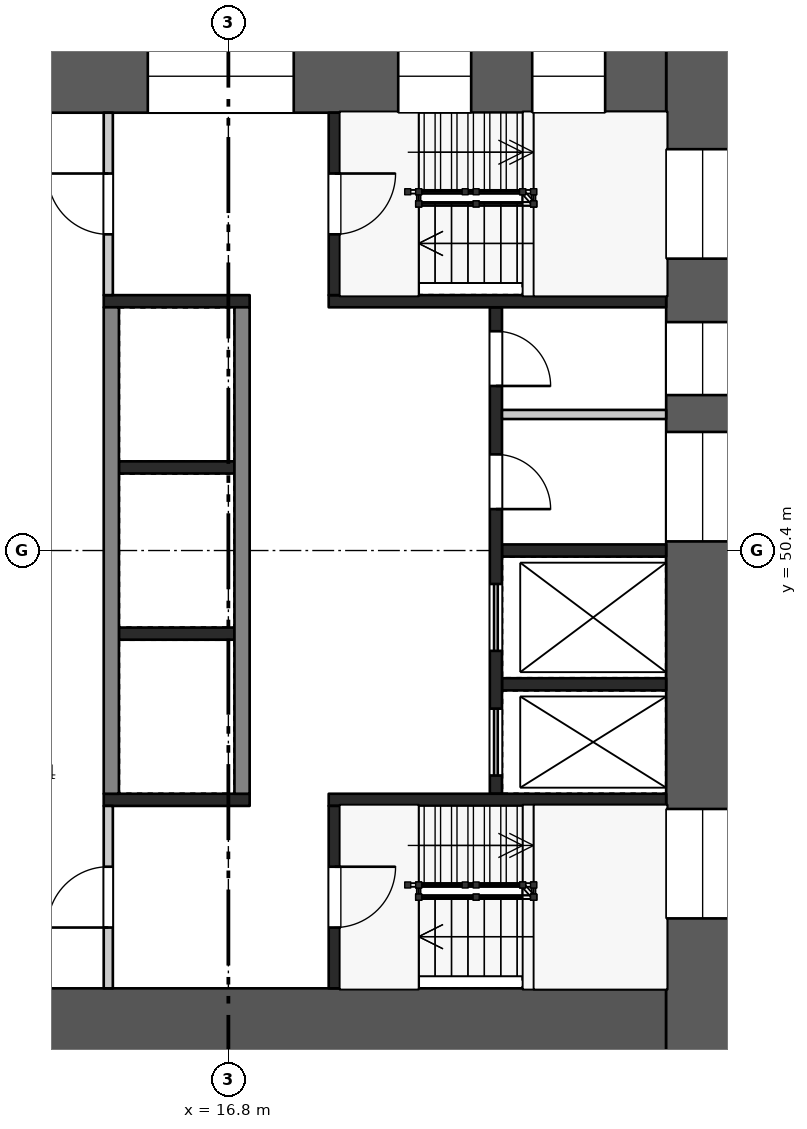
"""IFC4 building model, lengths in metres.
Left out: names, types, materials, properties, quantities, classifications, styles, units other than length and angle.
Written with IfcOpenShell. Run it as: python <this file> out.ifc"""

import sys

from ifc_helpers import new_model, si_unit, direction, frame, frame_2d, origin, place, context, subcontext, project, spatial, rectangle, extrude, element, fill, save


model = new_model("IFC4")
c1 = context("Model", 3, precision=1e-05, world=origin(), true_north=direction((0.0, 1.0)))
c2 = subcontext(c1, "Body", "Model", "MODEL_VIEW")
j1 = project(units=[si_unit("LENGTHUNIT", "METRE"), si_unit("PLANEANGLEUNIT", "RADIAN")], contexts=[c1])
p1 = place(None, origin())
s1 = spatial("IfcSite", under=j1, at=p1, CompositionType="ELEMENT")
p2 = place(p1, origin())
s2 = spatial("IfcBuilding", under=s1, at=p2, CompositionType="ELEMENT")
p3 = place(p2, frame((0.0, 0.0, 19.8)))
s3 = spatial("IfcBuildingStorey", under=s2, at=p3, CompositionType="ELEMENT", Elevation=19.8)
p4 = place(p3, frame((24.6, 58.8, 0.0), z_axis=(0.0, 0.0, 1.0), x_axis=(0.0, -1.0, 0.0)))
e1 = element("IfcWall", 1, at=p4, inside=s3, PredefinedType="SHEAR", context=c2, shape_type="SweptSolid", body=[
    extrude(rectangle(XDim=16.8, YDim=1.2, at=frame_2d((8.4, 0.0))), origin(), (0.0, 0.0, 1.0), 5.12),
])
p5 = place(p4, frame((1.8, 0.0, 0.5)))
e2 = element("IfcOpeningElement", 2, at=p5, cuts=e1, PredefinedType="OPENING", context=c2, shape_type="SweptSolid", body=[
    extrude(rectangle(XDim=1.8, YDim=2.4, at=frame_2d((0.9, 1.2))), frame((0.0, 0.61, 0.0), z_axis=(0.0, -1.0, 0.0), x_axis=(1.0, 0.0, 0.0)), (0.0, 0.0, 1.0), 1.22),
])
p6 = place(p4, frame((4.644, 0.0, 1.6)))
e3 = element("IfcOpeningElement", 3, at=p6, cuts=e1, PredefinedType="OPENING", context=c2, shape_type="SweptSolid", body=[
    extrude(rectangle(XDim=1.2, YDim=1.2, at=frame_2d((0.6, 0.6))), frame((0.0, 0.61, 0.0), z_axis=(0.0, -1.0, 0.0), x_axis=(1.0, 0.0, 0.0)), (0.0, 0.0, 1.0), 1.22),
])
p7 = place(p4, frame((6.45, 0.0, 1.6)))
e4 = element("IfcOpeningElement", 4, at=p7, cuts=e1, PredefinedType="OPENING", context=c2, shape_type="SweptSolid", body=[
    extrude(rectangle(XDim=1.8, YDim=1.2, at=frame_2d((0.9, 0.6))), frame((0.0, 0.61, 0.0), z_axis=(0.0, -1.0, 0.0), x_axis=(1.0, 0.0, 0.0)), (0.0, 0.0, 1.0), 1.22),
])
p8 = place(p4, frame((12.65, 0.0, 0.5)))
e5 = element("IfcOpeningElement", 5, at=p8, cuts=e1, PredefinedType="OPENING", context=c2, shape_type="SweptSolid", body=[
    extrude(rectangle(XDim=1.8, YDim=2.4, at=frame_2d((0.9, 1.2))), frame((0.0, 0.61, 0.0), z_axis=(0.0, -1.0, 0.0), x_axis=(1.0, 0.0, 0.0)), (0.0, 0.0, 1.0), 1.22),
])
p9 = place(p3, frame((9.6, 58.2, 0.0), z_axis=(0.0, 0.0, 1.0), x_axis=(1.0, 0.0, 0.0)))
e6 = element("IfcWall", 6, at=p9, inside=s3, PredefinedType="SHEAR", context=c2, shape_type="SweptSolid", body=[
    extrude(rectangle(XDim=14.4, YDim=1.2, at=frame_2d((7.2, 0.0))), origin(), (0.0, 0.0, 1.0), 5.12),
])
p10 = place(p9, frame((1.105, 0.0, 0.6)))
e7 = element("IfcOpeningElement", 7, at=p10, cuts=e6, PredefinedType="OPENING", context=c2, shape_type="SweptSolid", body=[
    extrude(rectangle(XDim=3.0, YDim=2.1, at=frame_2d((1.5, 1.05))), frame((0.0, 0.61, 0.0), z_axis=(0.0, -1.0, 0.0), x_axis=(1.0, 0.0, 0.0)), (0.0, 0.0, 1.0), 1.22),
])
p11 = place(p9, frame((5.875, 0.0, 0.6)))
e8 = element("IfcOpeningElement", 8, at=p11, cuts=e6, PredefinedType="OPENING", context=c2, shape_type="SweptSolid", body=[
    extrude(rectangle(XDim=2.4, YDim=2.1, at=frame_2d((1.2, 1.05))), frame((0.0, 0.61, 0.0), z_axis=(0.0, -1.0, 0.0), x_axis=(1.0, 0.0, 0.0)), (0.0, 0.0, 1.0), 1.22),
])
p12 = place(p9, frame((9.993, 0.0, 0.5)))
e9 = element("IfcOpeningElement", 9, at=p12, cuts=e6, PredefinedType="OPENING", context=c2, shape_type="SweptSolid", body=[
    extrude(rectangle(XDim=1.2, YDim=2.4, at=frame_2d((0.6, 1.2))), frame((0.0, 0.61, 0.0), z_axis=(0.0, -1.0, 0.0), x_axis=(1.0, 0.0, 0.0)), (0.0, 0.0, 1.0), 1.22),
])
p13 = place(p9, frame((12.197, 0.0, 0.5)))
e10 = element("IfcOpeningElement", 10, at=p13, cuts=e6, PredefinedType="OPENING", context=c2, shape_type="SweptSolid", body=[
    extrude(rectangle(XDim=1.2, YDim=2.4, at=frame_2d((0.6, 1.2))), frame((0.0, 0.61, 0.0), z_axis=(0.0, -1.0, 0.0), x_axis=(1.0, 0.0, 0.0)), (0.0, 0.0, 1.0), 1.22),
])
p14 = place(p3, frame((9.6, 42.6, 0.0), z_axis=(0.0, 0.0, 1.0), x_axis=(1.0, 0.0, 0.0)))
e11 = element("IfcWall", 11, at=p14, inside=s3, PredefinedType="SHEAR", context=c2, shape_type="SweptSolid", body=[
    extrude(rectangle(XDim=14.4, YDim=1.2, at=frame_2d((7.2, 0.0))), origin(), (0.0, 0.0, 1.0), 5.12),
])
p15 = place(p14, frame((2.1, 0.0, 0.0)))
e12 = element("IfcOpeningElement", 12, at=p15, cuts=e11, PredefinedType="OPENING", context=c2, shape_type="SweptSolid", body=[
    extrude(rectangle(XDim=1.8, YDim=2.1, at=frame_2d((0.9, 1.05))), frame((0.0, 0.61, 0.0), z_axis=(0.0, -1.0, 0.0), x_axis=(1.0, 0.0, 0.0)), (0.0, 0.0, 1.0), 1.22),
])
for number, where, z_axis, x_axis in (
    (13, (15.0, 51.767, 0.0), (0.0, 0.0, 1.0), (1.0, 0.0, 0.0)),
    (14, (15.0, 49.033, 0.0), (0.0, 0.0, 1.0), (1.0, 0.0, 0.0)),
):
    element("IfcWall", number, at=place(p3, frame(where, z_axis=z_axis, x_axis=x_axis)), inside=s3, PredefinedType="SHEAR", context=c2, shape_type="SweptSolid", body=[
        extrude(rectangle(XDim=1.9, YDim=0.2, at=frame_2d((0.95, 0.0))), origin(), (0.0, 0.0, 1.0), 5.12),
    ])
for number, where, z_axis, x_axis in (
    (15, (14.875, 54.4, 0.0), (0.0, 0.0, 1.0), (0.0, -1.0, 0.0)),
    (16, (17.025, 54.4, 0.0), (0.0, 0.0, 1.0), (0.0, -1.0, 0.0)),
):
    element("IfcWall", number, at=place(p3, frame(where, z_axis=z_axis, x_axis=x_axis)), inside=s3, PredefinedType="SHEAR", context=c2, shape_type="SweptSolid", body=[
        extrude(rectangle(XDim=8.0, YDim=0.25, at=frame_2d((4.0, 0.0))), origin(), (0.0, 0.0, 1.0), 5.12),
    ])
for number, where, z_axis, x_axis in (
    (17, (21.3, 50.4, 0.0), (0.0, 0.0, 1.0), (1.0, 0.0, 0.0)),
    (18, (21.3, 48.2, 0.0), (0.0, 0.0, 1.0), (1.0, 0.0, 0.0)),
):
    element("IfcWall", number, at=place(p3, frame(where, z_axis=z_axis, x_axis=x_axis)), inside=s3, PredefinedType="SHEAR", context=c2, shape_type="SweptSolid", body=[
        extrude(rectangle(XDim=2.7, YDim=0.2, at=frame_2d((1.35, 0.0))), origin(), (0.0, 0.0, 1.0), 5.12),
    ])
p16 = place(p3, frame((21.3, 52.637, 0.0), z_axis=(0.0, 0.0, 1.0), x_axis=(1.0, 0.0, 0.0)))
e19 = element("IfcWall", 19, at=p16, inside=s3, PredefinedType="PARTITIONING", context=c2, shape_type="SweptSolid", body=[
    extrude(rectangle(XDim=2.7, YDim=0.15, at=frame_2d((1.35, 0.0))), origin(), (0.0, 0.0, 1.0), 5.12),
])
p17 = place(p3, frame((21.2, 54.4, 0.0), z_axis=(0.0, 0.0, 1.0), x_axis=(0.0, -1.0, 0.0)))
e20 = element("IfcWall", 20, at=p17, inside=s3, PredefinedType="SHEAR", context=c2, shape_type="SweptSolid", body=[
    extrude(rectangle(XDim=8.0, YDim=0.2, at=frame_2d((4.0, 0.0))), origin(), (0.0, 0.0, 1.0), 5.12),
])
p18 = place(p17, frame((0.394, 0.0, 0.0)))
e21 = element("IfcOpeningElement", 21, at=p18, cuts=e20, PredefinedType="OPENING", context=c2, shape_type="SweptSolid", body=[
    extrude(rectangle(XDim=0.9, YDim=2.1, at=frame_2d((0.45, 1.05))), frame((0.0, 0.11, 0.0), z_axis=(0.0, -1.0, 0.0), x_axis=(1.0, 0.0, 0.0)), (0.0, 0.0, 1.0), 0.22),
])
p19 = place(p17, frame((2.419, 0.0, 0.0)))
e22 = element("IfcOpeningElement", 22, at=p19, cuts=e20, PredefinedType="OPENING", context=c2, shape_type="SweptSolid", body=[
    extrude(rectangle(XDim=0.9, YDim=2.1, at=frame_2d((0.45, 1.05))), frame((0.0, 0.11, 0.0), z_axis=(0.0, -1.0, 0.0), x_axis=(1.0, 0.0, 0.0)), (0.0, 0.0, 1.0), 0.22),
])
p20 = place(p17, frame((4.55, 0.0, 0.0)))
e23 = element("IfcOpeningElement", 23, at=p20, cuts=e20, PredefinedType="OPENING", context=c2, shape_type="SweptSolid", body=[
    extrude(rectangle(XDim=1.1, YDim=2.1, at=frame_2d((0.55, 1.05))), frame((0.0, 0.11, 0.0), z_axis=(0.0, -1.0, 0.0), x_axis=(1.0, 0.0, 0.0)), (0.0, 0.0, 1.0), 0.22),
])
p21 = place(p17, frame((6.6, 0.0, 0.0)))
e24 = element("IfcOpeningElement", 24, at=p21, cuts=e20, PredefinedType="OPENING", context=c2, shape_type="SweptSolid", body=[
    extrude(rectangle(XDim=1.1, YDim=2.1, at=frame_2d((0.55, 1.05))), frame((0.0, 0.11, 0.0), z_axis=(0.0, -1.0, 0.0), x_axis=(1.0, 0.0, 0.0)), (0.0, 0.0, 1.0), 0.22),
])
p22 = place(p3, frame((14.75, 54.5, 0.0), z_axis=(0.0, 0.0, 1.0), x_axis=(1.0, 0.0, 0.0)))
e25 = element("IfcWall", 25, at=p22, inside=s3, PredefinedType="SHEAR", context=c2, shape_type="SweptSolid", body=[
    extrude(rectangle(XDim=2.4, YDim=0.2, at=frame_2d((1.2, 0.0))), origin(), (0.0, 0.0, 1.0), 5.12),
])
p23 = place(p3, frame((18.45, 54.5, 0.0), z_axis=(0.0, 0.0, 1.0), x_axis=(1.0, 0.0, 0.0)))
e26 = element("IfcWall", 26, at=p23, inside=s3, PredefinedType="SHEAR", context=c2, shape_type="SweptSolid", body=[
    extrude(rectangle(XDim=5.55, YDim=0.2, at=frame_2d((2.775, 0.0))), origin(), (0.0, 0.0, 1.0), 5.12),
])
p24 = place(p3, frame((14.825, 57.6, 0.0), z_axis=(0.0, 0.0, 1.0), x_axis=(0.0, -1.0, 0.0)))
e27 = element("IfcWall", 27, at=p24, inside=s3, PredefinedType="PARTITIONING", context=c2, shape_type="SweptSolid", body=[
    extrude(rectangle(XDim=3.0, YDim=0.15, at=frame_2d((1.5, 0.0))), origin(), (0.0, 0.0, 1.0), 5.12),
])
p25 = place(p24, frame((1.0, 0.0, 0.0)))
e28 = element("IfcOpeningElement", 28, at=p25, cuts=e27, PredefinedType="OPENING", context=c2, shape_type="SweptSolid", body=[
    extrude(rectangle(XDim=1.0, YDim=2.1, at=frame_2d((0.5, 1.05))), frame((0.0, 0.085, 0.0), z_axis=(0.0, -1.0, 0.0), x_axis=(1.0, 0.0, 0.0)), (0.0, 0.0, 1.0), 0.17),
])
p26 = place(p3, frame((18.55, 57.6, 0.0), z_axis=(0.0, 0.0, 1.0), x_axis=(0.0, -1.0, 0.0)))
e29 = element("IfcWall", 29, at=p26, inside=s3, PredefinedType="SHEAR", context=c2, shape_type="SweptSolid", body=[
    extrude(rectangle(XDim=3.0, YDim=0.2, at=frame_2d((1.5, 0.0))), origin(), (0.0, 0.0, 1.0), 5.12),
])
p27 = place(p26, frame((1.0, 0.0, 0.0)))
e30 = element("IfcOpeningElement", 30, at=p27, cuts=e29, PredefinedType="OPENING", context=c2, shape_type="SweptSolid", body=[
    extrude(rectangle(XDim=1.0, YDim=2.1, at=frame_2d((0.5, 1.05))), frame((0.0, 0.11, 0.0), z_axis=(0.0, -1.0, 0.0), x_axis=(1.0, 0.0, 0.0)), (0.0, 0.0, 1.0), 0.22),
])
p28 = place(p3, frame((14.75, 46.3, 0.0), z_axis=(0.0, 0.0, 1.0), x_axis=(1.0, 0.0, 0.0)))
e31 = element("IfcWall", 31, at=p28, inside=s3, PredefinedType="SHEAR", context=c2, shape_type="SweptSolid", body=[
    extrude(rectangle(XDim=2.4, YDim=0.2, at=frame_2d((1.2, 0.0))), origin(), (0.0, 0.0, 1.0), 5.12),
])
p29 = place(p3, frame((18.45, 46.3, 0.0), z_axis=(0.0, 0.0, 1.0), x_axis=(1.0, 0.0, 0.0)))
e32 = element("IfcWall", 32, at=p29, inside=s3, PredefinedType="SHEAR", context=c2, shape_type="SweptSolid", body=[
    extrude(rectangle(XDim=5.55, YDim=0.2, at=frame_2d((2.775, 0.0))), origin(), (0.0, 0.0, 1.0), 5.12),
])
p30 = place(p3, frame((14.825, 46.2, 0.0), z_axis=(0.0, 0.0, 1.0), x_axis=(0.0, -1.0, 0.0)))
e33 = element("IfcWall", 33, at=p30, inside=s3, PredefinedType="PARTITIONING", context=c2, shape_type="SweptSolid", body=[
    extrude(rectangle(XDim=3.0, YDim=0.15, at=frame_2d((1.5, 0.0))), origin(), (0.0, 0.0, 1.0), 5.12),
])
p31 = place(p30, frame((1.0, 0.0, 0.0)))
e34 = element("IfcOpeningElement", 34, at=p31, cuts=e33, PredefinedType="OPENING", context=c2, shape_type="SweptSolid", body=[
    extrude(rectangle(XDim=1.0, YDim=2.1, at=frame_2d((0.5, 1.05))), frame((0.0, 0.085, 0.0), z_axis=(0.0, -1.0, 0.0), x_axis=(1.0, 0.0, 0.0)), (0.0, 0.0, 1.0), 0.17),
])
p32 = place(p3, frame((18.55, 46.2, 0.0), z_axis=(0.0, 0.0, 1.0), x_axis=(0.0, -1.0, 0.0)))
e35 = element("IfcWall", 35, at=p32, inside=s3, PredefinedType="SHEAR", context=c2, shape_type="SweptSolid", body=[
    extrude(rectangle(XDim=3.0, YDim=0.2, at=frame_2d((1.5, 0.0))), origin(), (0.0, 0.0, 1.0), 5.12),
])
p33 = place(p32, frame((1.0, 0.0, 0.0)))
e36 = element("IfcOpeningElement", 36, at=p33, cuts=e35, PredefinedType="OPENING", context=c2, shape_type="SweptSolid", body=[
    extrude(rectangle(XDim=1.0, YDim=2.1, at=frame_2d((0.5, 1.05))), frame((0.0, 0.11, 0.0), z_axis=(0.0, -1.0, 0.0), x_axis=(1.0, 0.0, 0.0)), (0.0, 0.0, 1.0), 0.22),
])
p34 = place(p18, origin())
e37 = element("IfcDoor", 37, at=p34, inside=s3, OperationType="SINGLE_SWING_RIGHT", PredefinedType="DOOR", context=c2, shape_type="SweptSolid", body=[
    extrude(rectangle(XDim=0.9, YDim=2.1, at=frame_2d((0.45, 1.05))), frame((0.0, 0.025, 0.0), z_axis=(0.0, -1.0, 0.0), x_axis=(1.0, 0.0, 0.0)), (0.0, 0.0, 1.0), 0.05),
])
fill(e21, e37)
p35 = place(p19, origin())
e38 = element("IfcDoor", 38, at=p35, inside=s3, OperationType="SINGLE_SWING_RIGHT", PredefinedType="DOOR", context=c2, shape_type="SweptSolid", body=[
    extrude(rectangle(XDim=0.9, YDim=2.1, at=frame_2d((0.45, 1.05))), frame((0.0, 0.025, 0.0), z_axis=(0.0, -1.0, 0.0), x_axis=(1.0, 0.0, 0.0)), (0.0, 0.0, 1.0), 0.05),
])
fill(e22, e38)
p36 = place(p20, origin())
e39 = element("IfcDoor", 39, at=p36, inside=s3, OperationType="DOUBLE_DOOR_SLIDING", PredefinedType="DOOR", context=c2, shape_type="SweptSolid", body=[
    extrude(rectangle(XDim=1.1, YDim=2.1, at=frame_2d((0.55, 1.05))), frame((0.0, 0.025, 0.0), z_axis=(0.0, -1.0, 0.0), x_axis=(1.0, 0.0, 0.0)), (0.0, 0.0, 1.0), 0.05),
])
fill(e23, e39)
p37 = place(p21, origin())
e40 = element("IfcDoor", 40, at=p37, inside=s3, OperationType="DOUBLE_DOOR_SLIDING", PredefinedType="DOOR", context=c2, shape_type="SweptSolid", body=[
    extrude(rectangle(XDim=1.1, YDim=2.1, at=frame_2d((0.55, 1.05))), frame((0.0, 0.025, 0.0), z_axis=(0.0, -1.0, 0.0), x_axis=(1.0, 0.0, 0.0)), (0.0, 0.0, 1.0), 0.05),
])
fill(e24, e40)
p38 = place(p25, frame((1.0, 0.0, 0.0), z_axis=(0.0, 0.0, 1.0), x_axis=(-1.0, 0.0, 0.0)))
e41 = element("IfcDoor", 41, at=p38, inside=s3, OperationType="SINGLE_SWING_RIGHT", PredefinedType="DOOR", context=c2, shape_type="SweptSolid", body=[
    extrude(rectangle(XDim=1.0, YDim=2.1, at=frame_2d((0.5, 1.05))), frame((0.0, 0.025, 0.0), z_axis=(0.0, -1.0, 0.0), x_axis=(1.0, 0.0, 0.0)), (0.0, 0.0, 1.0), 0.05),
])
fill(e28, e41)
p39 = place(p27, origin())
e42 = element("IfcDoor", 42, at=p39, inside=s3, OperationType="SINGLE_SWING_LEFT", PredefinedType="DOOR", context=c2, shape_type="SweptSolid", body=[
    extrude(rectangle(XDim=1.0, YDim=2.1, at=frame_2d((0.5, 1.05))), frame((0.0, 0.025, 0.0), z_axis=(0.0, -1.0, 0.0), x_axis=(1.0, 0.0, 0.0)), (0.0, 0.0, 1.0), 0.05),
])
fill(e30, e42)
p40 = place(p31, frame((1.0, 0.0, 0.0), z_axis=(0.0, 0.0, 1.0), x_axis=(-1.0, 0.0, 0.0)))
e43 = element("IfcDoor", 43, at=p40, inside=s3, OperationType="SINGLE_SWING_LEFT", PredefinedType="DOOR", context=c2, shape_type="SweptSolid", body=[
    extrude(rectangle(XDim=1.0, YDim=2.1, at=frame_2d((0.5, 1.05))), frame((0.0, 0.025, 0.0), z_axis=(0.0, -1.0, 0.0), x_axis=(1.0, 0.0, 0.0)), (0.0, 0.0, 1.0), 0.05),
])
fill(e34, e43)
p41 = place(p33, origin())
e44 = element("IfcDoor", 44, at=p41, inside=s3, OperationType="SINGLE_SWING_LEFT", PredefinedType="DOOR", context=c2, shape_type="SweptSolid", body=[
    extrude(rectangle(XDim=1.0, YDim=2.1, at=frame_2d((0.5, 1.05))), frame((0.0, 0.025, 0.0), z_axis=(0.0, -1.0, 0.0), x_axis=(1.0, 0.0, 0.0)), (0.0, 0.0, 1.0), 0.05),
])
fill(e36, e44)
p42 = place(p5, origin())
e45 = element("IfcWindow", 45, at=p42, inside=s3, PartitioningType="SINGLE_PANEL", PredefinedType="WINDOW", context=c2, shape_type="SweptSolid", body=[
    extrude(rectangle(XDim=1.8, YDim=2.4, at=frame_2d((0.9, 1.2))), frame((0.0, 0.03, 0.0), z_axis=(0.0, -1.0, 0.0), x_axis=(1.0, 0.0, 0.0)), (0.0, 0.0, 1.0), 0.06),
])
fill(e2, e45)
p43 = place(p6, origin())
e46 = element("IfcWindow", 46, at=p43, inside=s3, PartitioningType="SINGLE_PANEL", PredefinedType="WINDOW", context=c2, shape_type="SweptSolid", body=[
    extrude(rectangle(XDim=1.2, YDim=1.2, at=frame_2d((0.6, 0.6))), frame((0.0, 0.03, 0.0), z_axis=(0.0, -1.0, 0.0), x_axis=(1.0, 0.0, 0.0)), (0.0, 0.0, 1.0), 0.06),
])
fill(e3, e46)
p44 = place(p7, origin())
e47 = element("IfcWindow", 47, at=p44, inside=s3, PartitioningType="SINGLE_PANEL", PredefinedType="WINDOW", context=c2, shape_type="SweptSolid", body=[
    extrude(rectangle(XDim=1.8, YDim=1.2, at=frame_2d((0.9, 0.6))), frame((0.0, 0.03, 0.0), z_axis=(0.0, -1.0, 0.0), x_axis=(1.0, 0.0, 0.0)), (0.0, 0.0, 1.0), 0.06),
])
fill(e4, e47)
p45 = place(p8, origin())
e48 = element("IfcWindow", 48, at=p45, inside=s3, PartitioningType="SINGLE_PANEL", PredefinedType="WINDOW", context=c2, shape_type="SweptSolid", body=[
    extrude(rectangle(XDim=1.8, YDim=2.4, at=frame_2d((0.9, 1.2))), frame((0.0, 0.03, 0.0), z_axis=(0.0, -1.0, 0.0), x_axis=(1.0, 0.0, 0.0)), (0.0, 0.0, 1.0), 0.06),
])
fill(e5, e48)
p46 = place(p11, origin())
e49 = element("IfcWindow", 49, at=p46, inside=s3, PartitioningType="SINGLE_PANEL", PredefinedType="WINDOW", context=c2, shape_type="SweptSolid", body=[
    extrude(rectangle(XDim=2.4, YDim=2.1, at=frame_2d((1.2, 1.05))), frame((0.0, 0.03, 0.0), z_axis=(0.0, -1.0, 0.0), x_axis=(1.0, 0.0, 0.0)), (0.0, 0.0, 1.0), 0.06),
])
fill(e8, e49)
p47 = place(p12, origin())
e50 = element("IfcWindow", 50, at=p47, inside=s3, PartitioningType="SINGLE_PANEL", PredefinedType="WINDOW", context=c2, shape_type="SweptSolid", body=[
    extrude(rectangle(XDim=1.2, YDim=2.4, at=frame_2d((0.6, 1.2))), frame((0.0, 0.03, 0.0), z_axis=(0.0, -1.0, 0.0), x_axis=(1.0, 0.0, 0.0)), (0.0, 0.0, 1.0), 0.06),
])
fill(e9, e50)
p48 = place(p13, origin())
e51 = element("IfcWindow", 51, at=p48, inside=s3, PartitioningType="SINGLE_PANEL", PredefinedType="WINDOW", context=c2, shape_type="SweptSolid", body=[
    extrude(rectangle(XDim=1.2, YDim=2.4, at=frame_2d((0.6, 1.2))), frame((0.0, 0.03, 0.0), z_axis=(0.0, -1.0, 0.0), x_axis=(1.0, 0.0, 0.0)), (0.0, 0.0, 1.0), 0.06),
])
fill(e10, e51)
save(model, sys.argv[1])
